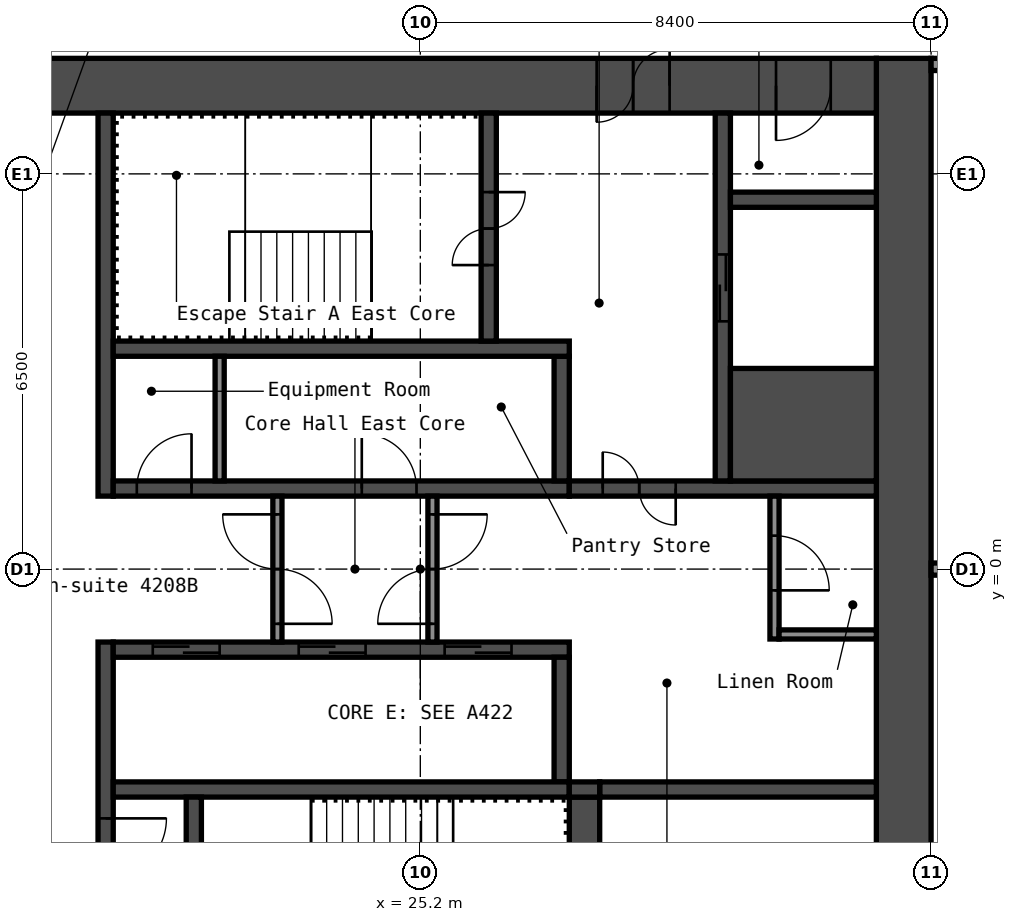
"""IFC4 building model, lengths in metres.
Left out: names, types, materials, properties, quantities, classifications, styles, units other than length and angle.
Written with IfcOpenShell. Run it as: python <this file> out.ifc"""

import sys

from ifc_helpers import new_model, si_unit, direction, frame, frame_2d, origin, place, context, subcontext, project, spatial, rectangle, extrude, element, fill, save


model = new_model("IFC4")
c1 = context("Model", 3, precision=1e-05, world=origin(), true_north=direction((0.0, 1.0)))
c2 = subcontext(c1, "Body", "Model", "MODEL_VIEW")
j1 = project(units=[si_unit("LENGTHUNIT", "METRE"), si_unit("PLANEANGLEUNIT", "RADIAN")], contexts=[c1])
p1 = place(None, origin())
s1 = spatial("IfcSite", under=j1, at=p1, CompositionType="ELEMENT")
p2 = place(p1, origin())
s2 = spatial("IfcBuilding", under=s1, at=p2, CompositionType="ELEMENT")
p3 = place(p2, frame((0.0, 0.0, 150.2)))
s3 = spatial("IfcBuildingStorey", under=s2, at=p3, CompositionType="ELEMENT", Elevation=150.2)
p4 = place(p3, frame((33.15, -8.4, 0.0), z_axis=(0.0, 0.0, 1.0), x_axis=(0.0, 1.0, 0.0)))
e1 = element("IfcWall", 1, at=p4, inside=s3, PredefinedType="SHEAR", context=c2, shape_type="SweptSolid", body=[
    extrude(rectangle(XDim=16.8, YDim=0.9, at=frame_2d((8.4, 0.0))), origin(), (0.0, 0.0, 1.0), 2.75),
])
p5 = place(p3, frame((17.7, 7.95, 0.0), z_axis=(0.0, 0.0, 1.0), x_axis=(1.0, 0.0, 0.0)))
e2 = element("IfcWall", 2, at=p5, inside=s3, PredefinedType="SHEAR", context=c2, shape_type="SweptSolid", body=[
    extrude(rectangle(XDim=15.0, YDim=0.9, at=frame_2d((7.5, 0.0))), origin(), (0.0, 0.0, 1.0), 2.75),
])
p6 = place(p5, frame((10.4, 0.0, 0.0)))
e3 = element("IfcOpeningElement", 3, at=p6, cuts=e2, PredefinedType="OPENING", context=c2, shape_type="SweptSolid", body=[
    extrude(rectangle(XDim=1.2, YDim=2.1, at=frame_2d((0.6, 1.05))), frame((0.0, 0.46, 0.0), z_axis=(0.0, -1.0, 0.0), x_axis=(1.0, 0.0, 0.0)), (0.0, 0.0, 1.0), 0.92),
])
p7 = place(p5, frame((13.35, 0.0, 0.0)))
e4 = element("IfcOpeningElement", 4, at=p7, cuts=e2, PredefinedType="OPENING", context=c2, shape_type="SweptSolid", body=[
    extrude(rectangle(XDim=0.9, YDim=2.1, at=frame_2d((0.45, 1.05))), frame((0.0, 0.46, 0.0), z_axis=(0.0, -1.0, 0.0), x_axis=(1.0, 0.0, 0.0)), (0.0, 0.0, 1.0), 0.92),
])
p8 = place(p3, frame((20.025, 1.2, 0.0), z_axis=(0.0, 0.0, 1.0), x_axis=(0.0, 1.0, 0.0)))
e5 = element("IfcWall", 5, at=p8, inside=s3, PredefinedType="SHEAR", context=c2, shape_type="SweptSolid", body=[
    extrude(rectangle(XDim=6.3, YDim=0.25, at=frame_2d((3.15, 0.0))), origin(), (0.0, 0.0, 1.0), 2.75),
])
p9 = place(p3, frame((20.025, -7.5, 0.0), z_axis=(0.0, 0.0, 1.0), x_axis=(0.0, 1.0, 0.0)))
e6 = element("IfcWall", 6, at=p9, inside=s3, PredefinedType="SHEAR", context=c2, shape_type="SweptSolid", body=[
    extrude(rectangle(XDim=6.3, YDim=0.25, at=frame_2d((3.15, 0.0))), origin(), (0.0, 0.0, 1.0), 2.75),
])
p10 = place(p9, frame((2.4, 0.0, 0.0)))
e7 = element("IfcOpeningElement", 7, at=p10, cuts=e6, PredefinedType="OPENING", context=c2, shape_type="SweptSolid", body=[
    extrude(rectangle(XDim=1.0, YDim=2.1, at=frame_2d((0.5, 1.05))), frame((0.0, 0.135, 0.0), z_axis=(0.0, -1.0, 0.0), x_axis=(1.0, 0.0, 0.0)), (0.0, 0.0, 1.0), 0.27),
])
p11 = place(p3, frame((20.15, 1.325, 0.0), z_axis=(0.0, 0.0, 1.0), x_axis=(1.0, 0.0, 0.0)))
e8 = element("IfcWall", 8, at=p11, inside=s3, PredefinedType="SHEAR", context=c2, shape_type="SweptSolid", body=[
    extrude(rectangle(XDim=7.5, YDim=0.25, at=frame_2d((3.75, 0.0))), origin(), (0.0, 0.0, 1.0), 2.75),
])
p12 = place(p11, frame((0.387, 0.0, 0.0)))
e9 = element("IfcOpeningElement", 9, at=p12, cuts=e8, PredefinedType="OPENING", context=c2, shape_type="SweptSolid", body=[
    extrude(rectangle(XDim=0.9, YDim=2.1, at=frame_2d((0.45, 1.05))), frame((0.0, 0.135, 0.0), z_axis=(0.0, -1.0, 0.0), x_axis=(1.0, 0.0, 0.0)), (0.0, 0.0, 1.0), 0.27),
])
p13 = place(p11, frame((4.087, 0.0, 0.0)))
e10 = element("IfcOpeningElement", 10, at=p13, cuts=e8, PredefinedType="OPENING", context=c2, shape_type="SweptSolid", body=[
    extrude(rectangle(XDim=0.9, YDim=2.1, at=frame_2d((0.45, 1.05))), frame((0.0, 0.135, 0.0), z_axis=(0.0, -1.0, 0.0), x_axis=(1.0, 0.0, 0.0)), (0.0, 0.0, 1.0), 0.27),
])
p14 = place(p3, frame((27.525, 1.45, 0.0), z_axis=(0.0, 0.0, 1.0), x_axis=(0.0, 1.0, 0.0)))
e11 = element("IfcWall", 11, at=p14, inside=s3, PredefinedType="SHEAR", context=c2, shape_type="SweptSolid", body=[
    extrude(rectangle(XDim=2.05, YDim=0.25, at=frame_2d((1.025, 0.0))), origin(), (0.0, 0.0, 1.0), 2.75),
])
p15 = place(p3, frame((20.15, 3.625, 0.0), z_axis=(0.0, 0.0, 1.0), x_axis=(1.0, 0.0, 0.0)))
e12 = element("IfcWall", 12, at=p15, inside=s3, PredefinedType="SHEAR", context=c2, shape_type="SweptSolid", body=[
    extrude(rectangle(XDim=7.5, YDim=0.25, at=frame_2d((3.75, 0.0))), origin(), (0.0, 0.0, 1.0), 2.75),
])
p16 = place(p3, frame((26.325, 3.75, 0.0), z_axis=(0.0, 0.0, 1.0), x_axis=(0.0, 1.0, 0.0)))
e13 = element("IfcWall", 13, at=p16, inside=s3, PredefinedType="SHEAR", context=c2, shape_type="SweptSolid", body=[
    extrude(rectangle(XDim=3.75, YDim=0.25, at=frame_2d((1.875, 0.0))), origin(), (0.0, 0.0, 1.0), 2.75),
])
p17 = place(p16, frame((1.25, 0.0, 0.0)))
e14 = element("IfcOpeningElement", 14, at=p17, cuts=e13, PredefinedType="OPENING", context=c2, shape_type="SweptSolid", body=[
    extrude(rectangle(XDim=1.2, YDim=2.1, at=frame_2d((0.6, 1.05))), frame((0.0, 0.135, 0.0), z_axis=(0.0, -1.0, 0.0), x_axis=(1.0, 0.0, 0.0)), (0.0, 0.0, 1.0), 0.27),
])
p18 = place(p3, frame((27.65, 1.325, 0.0), z_axis=(0.0, 0.0, 1.0), x_axis=(1.0, 0.0, 0.0)))
e15 = element("IfcWall", 15, at=p18, inside=s3, PredefinedType="SHEAR", context=c2, shape_type="SweptSolid", body=[
    extrude(rectangle(XDim=5.05, YDim=0.25, at=frame_2d((2.525, 0.0))), origin(), (0.0, 0.0, 1.0), 2.75),
])
p19 = place(p18, frame((0.55, 0.0, 0.0)))
e16 = element("IfcOpeningElement", 16, at=p19, cuts=e15, PredefinedType="OPENING", context=c2, shape_type="SweptSolid", body=[
    extrude(rectangle(XDim=1.2, YDim=2.1, at=frame_2d((0.6, 1.05))), frame((0.0, 0.135, 0.0), z_axis=(0.0, -1.0, 0.0), x_axis=(1.0, 0.0, 0.0)), (0.0, 0.0, 1.0), 0.27),
])
p20 = place(p3, frame((30.175, 1.45, 0.0), z_axis=(0.0, 0.0, 1.0), x_axis=(0.0, 1.0, 0.0)))
e17 = element("IfcWall", 17, at=p20, inside=s3, PredefinedType="SHEAR", context=c2, shape_type="SweptSolid", body=[
    extrude(rectangle(XDim=6.05, YDim=0.25, at=frame_2d((3.025, 0.0))), origin(), (0.0, 0.0, 1.0), 2.75),
])
p21 = place(p20, frame((2.625, 0.0, 0.0)))
e18 = element("IfcOpeningElement", 18, at=p21, cuts=e17, PredefinedType="OPENING", context=c2, shape_type="SweptSolid", body=[
    extrude(rectangle(XDim=1.1, YDim=2.1, at=frame_2d((0.55, 1.05))), frame((0.0, 0.135, 0.0), z_axis=(0.0, -1.0, 0.0), x_axis=(1.0, 0.0, 0.0)), (0.0, 0.0, 1.0), 0.27),
])
p22 = place(p3, frame((30.3, 2.375, 0.0), z_axis=(0.0, 0.0, 1.0), x_axis=(1.0, 0.0, 0.0)))
e19 = element("IfcWall", 19, at=p22, inside=s3, PredefinedType="SHEAR", context=c2, shape_type="SweptSolid", body=[
    extrude(rectangle(XDim=2.4, YDim=1.85, at=frame_2d((1.2, 0.0))), origin(), (0.0, 0.0, 1.0), 2.75),
])
p23 = place(p3, frame((30.3, 6.075, 0.0), z_axis=(0.0, 0.0, 1.0), x_axis=(1.0, 0.0, 0.0)))
e20 = element("IfcWall", 20, at=p23, inside=s3, PredefinedType="SHEAR", context=c2, shape_type="SweptSolid", body=[
    extrude(rectangle(XDim=2.4, YDim=0.25, at=frame_2d((1.2, 0.0))), origin(), (0.0, 0.0, 1.0), 2.75),
])
p24 = place(p3, frame((20.15, -1.325, 0.0), z_axis=(0.0, 0.0, 1.0), x_axis=(1.0, 0.0, 0.0)))
e21 = element("IfcWall", 21, at=p24, inside=s3, PredefinedType="SHEAR", context=c2, shape_type="SweptSolid", body=[
    extrude(rectangle(XDim=7.5, YDim=0.25, at=frame_2d((3.75, 0.0))), origin(), (0.0, 0.0, 1.0), 2.75),
])
p25 = place(p24, frame((0.65, 0.0, 0.0)))
e22 = element("IfcOpeningElement", 22, at=p25, cuts=e21, PredefinedType="OPENING", context=c2, shape_type="SweptSolid", body=[
    extrude(rectangle(XDim=1.1, YDim=2.1, at=frame_2d((0.55, 1.05))), frame((0.0, 0.135, 0.0), z_axis=(0.0, -1.0, 0.0), x_axis=(1.0, 0.0, 0.0)), (0.0, 0.0, 1.0), 0.27),
])
p26 = place(p24, frame((3.05, 0.0, 0.0)))
e23 = element("IfcOpeningElement", 23, at=p26, cuts=e21, PredefinedType="OPENING", context=c2, shape_type="SweptSolid", body=[
    extrude(rectangle(XDim=1.1, YDim=2.1, at=frame_2d((0.55, 1.05))), frame((0.0, 0.135, 0.0), z_axis=(0.0, -1.0, 0.0), x_axis=(1.0, 0.0, 0.0)), (0.0, 0.0, 1.0), 0.27),
])
p27 = place(p24, frame((5.45, 0.0, 0.0)))
e24 = element("IfcOpeningElement", 24, at=p27, cuts=e21, PredefinedType="OPENING", context=c2, shape_type="SweptSolid", body=[
    extrude(rectangle(XDim=1.1, YDim=2.1, at=frame_2d((0.55, 1.05))), frame((0.0, 0.135, 0.0), z_axis=(0.0, -1.0, 0.0), x_axis=(1.0, 0.0, 0.0)), (0.0, 0.0, 1.0), 0.27),
])
p28 = place(p3, frame((27.525, -3.5, 0.0), z_axis=(0.0, 0.0, 1.0), x_axis=(0.0, 1.0, 0.0)))
e25 = element("IfcWall", 25, at=p28, inside=s3, PredefinedType="SHEAR", context=c2, shape_type="SweptSolid", body=[
    extrude(rectangle(XDim=2.05, YDim=0.25, at=frame_2d((1.025, 0.0))), origin(), (0.0, 0.0, 1.0), 2.75),
])
p29 = place(p3, frame((20.15, -3.625, 0.0), z_axis=(0.0, 0.0, 1.0), x_axis=(1.0, 0.0, 0.0)))
e26 = element("IfcWall", 26, at=p29, inside=s3, PredefinedType="SHEAR", context=c2, shape_type="SweptSolid", body=[
    extrude(rectangle(XDim=7.5, YDim=0.25, at=frame_2d((3.75, 0.0))), origin(), (0.0, 0.0, 1.0), 2.75),
])
p30 = place(p3, frame((21.475, -7.5, 0.0), z_axis=(0.0, 0.0, 1.0), x_axis=(0.0, 1.0, 0.0)))
e27 = element("IfcWall", 27, at=p30, inside=s3, PredefinedType="SHEAR", context=c2, shape_type="SweptSolid", body=[
    extrude(rectangle(XDim=3.75, YDim=0.25, at=frame_2d((1.875, 0.0))), origin(), (0.0, 0.0, 1.0), 2.75),
])
p31 = place(p30, frame((1.3, 0.0, 0.0)))
e28 = element("IfcOpeningElement", 28, at=p31, cuts=e27, PredefinedType="OPENING", context=c2, shape_type="SweptSolid", body=[
    extrude(rectangle(XDim=1.2, YDim=2.1, at=frame_2d((0.6, 1.05))), frame((0.0, 0.135, 0.0), z_axis=(0.0, -1.0, 0.0), x_axis=(1.0, 0.0, 0.0)), (0.0, 0.0, 1.0), 0.27),
])
p32 = place(p3, frame((27.9, -7.5, 0.0), z_axis=(0.0, 0.0, 1.0), x_axis=(0.0, 1.0, 0.0)))
e29 = element("IfcWall", 29, at=p32, inside=s3, PredefinedType="SHEAR", context=c2, shape_type="SweptSolid", body=[
    extrude(rectangle(XDim=3.75, YDim=0.5, at=frame_2d((1.875, 0.0))), origin(), (0.0, 0.0, 1.0), 2.75),
])
p33 = place(p3, frame((28.15, -3.625, 0.0), z_axis=(0.0, 0.0, 1.0), x_axis=(1.0, 0.0, 0.0)))
e30 = element("IfcWall", 30, at=p33, inside=s3, PredefinedType="SHEAR", context=c2, shape_type="SweptSolid", body=[
    extrude(rectangle(XDim=4.55, YDim=0.25, at=frame_2d((2.275, 0.0))), origin(), (0.0, 0.0, 1.0), 2.75),
])
p34 = place(p3, frame((27.65, -3.625, 0.0), z_axis=(0.0, 0.0, 1.0), x_axis=(1.0, 0.0, 0.0)))
e31 = element("IfcWall", 31, at=p34, inside=s3, PredefinedType="SHEAR", context=c2, shape_type="SweptSolid", body=[
    extrude(rectangle(XDim=0.5, YDim=0.25, at=frame_2d((0.25, 0.0))), origin(), (0.0, 0.0, 1.0), 2.75),
])
p35 = place(p3, frame((22.85, -1.2, 0.0), z_axis=(0.0, 0.0, 1.0), x_axis=(0.0, 1.0, 0.0)))
e32 = element("IfcWall", 32, at=p35, inside=s3, PredefinedType="PARTITIONING", context=c2, shape_type="SweptSolid", body=[
    extrude(rectangle(XDim=2.4, YDim=0.15, at=frame_2d((1.2, 0.0))), origin(), (0.0, 0.0, 1.0), 2.75),
])
p36 = place(p35, frame((0.3, 0.0, 0.0)))
e33 = element("IfcOpeningElement", 33, at=p36, cuts=e32, PredefinedType="OPENING", context=c2, shape_type="SweptSolid", body=[
    extrude(rectangle(XDim=1.8, YDim=2.1, at=frame_2d((0.9, 1.05))), frame((0.0, 0.085, 0.0), z_axis=(0.0, -1.0, 0.0), x_axis=(1.0, 0.0, 0.0)), (0.0, 0.0, 1.0), 0.17),
])
p37 = place(p3, frame((25.4, -1.2, 0.0), z_axis=(0.0, 0.0, 1.0), x_axis=(0.0, 1.0, 0.0)))
e34 = element("IfcWall", 34, at=p37, inside=s3, PredefinedType="PARTITIONING", context=c2, shape_type="SweptSolid", body=[
    extrude(rectangle(XDim=2.4, YDim=0.15, at=frame_2d((1.2, 0.0))), origin(), (0.0, 0.0, 1.0), 2.75),
])
p38 = place(p37, frame((0.3, 0.0, 0.0)))
e35 = element("IfcOpeningElement", 35, at=p38, cuts=e34, PredefinedType="OPENING", context=c2, shape_type="SweptSolid", body=[
    extrude(rectangle(XDim=1.8, YDim=2.1, at=frame_2d((0.9, 1.05))), frame((0.0, 0.085, 0.0), z_axis=(0.0, -1.0, 0.0), x_axis=(1.0, 0.0, 0.0)), (0.0, 0.0, 1.0), 0.17),
])
p39 = place(p3, frame((31.025, -1.15, 0.0), z_axis=(0.0, 0.0, 1.0), x_axis=(0.0, 1.0, 0.0)))
e36 = element("IfcWall", 36, at=p39, inside=s3, PredefinedType="PARTITIONING", context=c2, shape_type="SweptSolid", body=[
    extrude(rectangle(XDim=2.35, YDim=0.15, at=frame_2d((1.175, 0.0))), origin(), (0.0, 0.0, 1.0), 2.75),
])
p40 = place(p39, frame((0.8, 0.0, 0.0)))
e37 = element("IfcOpeningElement", 37, at=p40, cuts=e36, PredefinedType="OPENING", context=c2, shape_type="SweptSolid", body=[
    extrude(rectangle(XDim=0.9, YDim=2.1, at=frame_2d((0.45, 1.05))), frame((0.0, 0.085, 0.0), z_axis=(0.0, -1.0, 0.0), x_axis=(1.0, 0.0, 0.0)), (0.0, 0.0, 1.0), 0.17),
])
p41 = place(p3, frame((31.1, -1.075, 0.0), z_axis=(0.0, 0.0, 1.0), x_axis=(1.0, 0.0, 0.0)))
e38 = element("IfcWall", 38, at=p41, inside=s3, PredefinedType="PARTITIONING", context=c2, shape_type="SweptSolid", body=[
    extrude(rectangle(XDim=1.6, YDim=0.15, at=frame_2d((0.8, 0.0))), origin(), (0.0, 0.0, 1.0), 2.75),
])
p42 = place(p3, frame((21.9, 1.45, 0.0), z_axis=(0.0, 0.0, 1.0), x_axis=(0.0, 1.0, 0.0)))
e39 = element("IfcWall", 39, at=p42, inside=s3, PredefinedType="PARTITIONING", context=c2, shape_type="SweptSolid", body=[
    extrude(rectangle(XDim=2.05, YDim=0.15, at=frame_2d((1.025, 0.0))), origin(), (0.0, 0.0, 1.0), 2.75),
])
p43 = place(p3, frame((33.6, 0.0, 0.0), z_axis=(0.0, 0.0, 1.0), x_axis=(1.0, 0.0, 0.0)))
e40 = element("IfcWall", 40, at=p43, inside=s3, PredefinedType="PARTITIONING", context=c2, shape_type="SweptSolid", body=[
    extrude(rectangle(XDim=6.5, YDim=0.2, at=frame_2d((3.25, 0.0))), origin(), (0.0, 0.0, 1.0), 2.75),
])
p44 = place(p3, frame((33.6, 8.3, 0.0), z_axis=(0.0, 0.0, 1.0), x_axis=(1.0, 0.0, 0.0)))
e41 = element("IfcWall", 41, at=p44, inside=s3, PredefinedType="PARTITIONING", context=c2, shape_type="SweptSolid", body=[
    extrude(rectangle(XDim=6.6, YDim=0.2, at=frame_2d((3.3, 0.0))), origin(), (0.0, 0.0, 1.0), 2.75),
])
p45 = place(p44, frame((1.66, 0.0, 0.0)))
e42 = element("IfcOpeningElement", 42, at=p45, cuts=e41, PredefinedType="OPENING", context=c2, shape_type="SweptSolid", body=[
    extrude(rectangle(XDim=0.9, YDim=2.1, at=frame_2d((0.45, 1.05))), frame((0.0, 0.11, 0.0), z_axis=(0.0, -1.0, 0.0), x_axis=(1.0, 0.0, 0.0)), (0.0, 0.0, 1.0), 0.22),
])
p46 = place(p44, frame((4.96, 0.0, 0.0)))
e43 = element("IfcOpeningElement", 43, at=p46, cuts=e41, PredefinedType="OPENING", context=c2, shape_type="SweptSolid", body=[
    extrude(rectangle(XDim=0.9, YDim=2.1, at=frame_2d((0.45, 1.05))), frame((0.0, 0.11, 0.0), z_axis=(0.0, -1.0, 0.0), x_axis=(1.0, 0.0, 0.0)), (0.0, 0.0, 1.0), 0.22),
])
p47 = place(p6, origin())
e44 = element("IfcDoor", 44, at=p47, inside=s3, OperationType="DOUBLE_DOOR_SINGLE_SWING", PredefinedType="DOOR", context=c2, shape_type="SweptSolid", body=[
    extrude(rectangle(XDim=1.2, YDim=2.1, at=frame_2d((0.6, 1.05))), frame((0.0, 0.025, 0.0), z_axis=(0.0, -1.0, 0.0), x_axis=(1.0, 0.0, 0.0)), (0.0, 0.0, 1.0), 0.05),
])
fill(e3, e44)
p48 = place(p7, origin())
e45 = element("IfcDoor", 45, at=p48, inside=s3, OperationType="SINGLE_SWING_LEFT", PredefinedType="DOOR", context=c2, shape_type="SweptSolid", body=[
    extrude(rectangle(XDim=0.9, YDim=2.1, at=frame_2d((0.45, 1.05))), frame((0.0, 0.025, 0.0), z_axis=(0.0, -1.0, 0.0), x_axis=(1.0, 0.0, 0.0)), (0.0, 0.0, 1.0), 0.05),
])
fill(e4, e45)
p49 = place(p17, origin())
e46 = element("IfcDoor", 46, at=p49, inside=s3, OperationType="DOUBLE_DOOR_SINGLE_SWING", PredefinedType="DOOR", context=c2, shape_type="SweptSolid", body=[
    extrude(rectangle(XDim=1.2, YDim=2.1, at=frame_2d((0.6, 1.05))), frame((0.0, 0.025, 0.0), z_axis=(0.0, -1.0, 0.0), x_axis=(1.0, 0.0, 0.0)), (0.0, 0.0, 1.0), 0.05),
])
fill(e14, e46)
p50 = place(p10, origin())
e47 = element("IfcDoor", 47, at=p50, inside=s3, OperationType="SINGLE_SWING_RIGHT", PredefinedType="DOOR", context=c2, shape_type="SweptSolid", body=[
    extrude(rectangle(XDim=1.0, YDim=2.1, at=frame_2d((0.5, 1.05))), frame((0.0, 0.025, 0.0), z_axis=(0.0, -1.0, 0.0), x_axis=(1.0, 0.0, 0.0)), (0.0, 0.0, 1.0), 0.05),
])
fill(e7, e47)
p51 = place(p19, origin())
e48 = element("IfcDoor", 48, at=p51, inside=s3, OperationType="DOUBLE_DOOR_SINGLE_SWING", PredefinedType="DOOR", context=c2, shape_type="SweptSolid", body=[
    extrude(rectangle(XDim=1.2, YDim=2.1, at=frame_2d((0.6, 1.05))), frame((0.0, 0.025, 0.0), z_axis=(0.0, -1.0, 0.0), x_axis=(1.0, 0.0, 0.0)), (0.0, 0.0, 1.0), 0.05),
])
fill(e16, e48)
p52 = place(p36, origin())
e49 = element("IfcDoor", 49, at=p52, inside=s3, OperationType="DOUBLE_DOOR_SINGLE_SWING", PredefinedType="DOOR", context=c2, shape_type="SweptSolid", body=[
    extrude(rectangle(XDim=1.8, YDim=2.1, at=frame_2d((0.9, 1.05))), frame((0.0, 0.025, 0.0), z_axis=(0.0, -1.0, 0.0), x_axis=(1.0, 0.0, 0.0)), (0.0, 0.0, 1.0), 0.05),
])
fill(e33, e49)
p53 = place(p38, origin())
e50 = element("IfcDoor", 50, at=p53, inside=s3, OperationType="DOUBLE_DOOR_SINGLE_SWING", PredefinedType="DOOR", context=c2, shape_type="SweptSolid", body=[
    extrude(rectangle(XDim=1.8, YDim=2.1, at=frame_2d((0.9, 1.05))), frame((0.0, 0.025, 0.0), z_axis=(0.0, -1.0, 0.0), x_axis=(1.0, 0.0, 0.0)), (0.0, 0.0, 1.0), 0.05),
])
fill(e35, e50)
p54 = place(p40, origin())
e51 = element("IfcDoor", 51, at=p54, inside=s3, OperationType="SINGLE_SWING_LEFT", PredefinedType="DOOR", context=c2, shape_type="SweptSolid", body=[
    extrude(rectangle(XDim=0.9, YDim=2.1, at=frame_2d((0.45, 1.05))), frame((0.0, 0.025, 0.0), z_axis=(0.0, -1.0, 0.0), x_axis=(1.0, 0.0, 0.0)), (0.0, 0.0, 1.0), 0.05),
])
fill(e37, e51)
p55 = place(p12, origin())
e52 = element("IfcDoor", 52, at=p55, inside=s3, OperationType="SINGLE_SWING_LEFT", PredefinedType="DOOR", context=c2, shape_type="SweptSolid", body=[
    extrude(rectangle(XDim=0.9, YDim=2.1, at=frame_2d((0.45, 1.05))), frame((0.0, 0.025, 0.0), z_axis=(0.0, -1.0, 0.0), x_axis=(1.0, 0.0, 0.0)), (0.0, 0.0, 1.0), 0.05),
])
fill(e9, e52)
p56 = place(p13, origin())
e53 = element("IfcDoor", 53, at=p56, inside=s3, OperationType="SINGLE_SWING_RIGHT", PredefinedType="DOOR", context=c2, shape_type="SweptSolid", body=[
    extrude(rectangle(XDim=0.9, YDim=2.1, at=frame_2d((0.45, 1.05))), frame((0.0, 0.025, 0.0), z_axis=(0.0, -1.0, 0.0), x_axis=(1.0, 0.0, 0.0)), (0.0, 0.0, 1.0), 0.05),
])
fill(e10, e53)
p57 = place(p25, origin())
e54 = element("IfcDoor", 54, at=p57, inside=s3, OperationType="DOUBLE_DOOR_SLIDING", PredefinedType="DOOR", context=c2, shape_type="SweptSolid", body=[
    extrude(rectangle(XDim=1.1, YDim=2.1, at=frame_2d((0.55, 1.05))), frame((0.0, 0.025, 0.0), z_axis=(0.0, -1.0, 0.0), x_axis=(1.0, 0.0, 0.0)), (0.0, 0.0, 1.0), 0.05),
])
fill(e22, e54)
p58 = place(p26, origin())
e55 = element("IfcDoor", 55, at=p58, inside=s3, OperationType="DOUBLE_DOOR_SLIDING", PredefinedType="DOOR", context=c2, shape_type="SweptSolid", body=[
    extrude(rectangle(XDim=1.1, YDim=2.1, at=frame_2d((0.55, 1.05))), frame((0.0, 0.025, 0.0), z_axis=(0.0, -1.0, 0.0), x_axis=(1.0, 0.0, 0.0)), (0.0, 0.0, 1.0), 0.05),
])
fill(e23, e55)
p59 = place(p27, origin())
e56 = element("IfcDoor", 56, at=p59, inside=s3, OperationType="DOUBLE_DOOR_SLIDING", PredefinedType="DOOR", context=c2, shape_type="SweptSolid", body=[
    extrude(rectangle(XDim=1.1, YDim=2.1, at=frame_2d((0.55, 1.05))), frame((0.0, 0.025, 0.0), z_axis=(0.0, -1.0, 0.0), x_axis=(1.0, 0.0, 0.0)), (0.0, 0.0, 1.0), 0.05),
])
fill(e24, e56)
p60 = place(p21, origin())
e57 = element("IfcDoor", 57, at=p60, inside=s3, OperationType="DOUBLE_DOOR_SLIDING", PredefinedType="DOOR", context=c2, shape_type="SweptSolid", body=[
    extrude(rectangle(XDim=1.1, YDim=2.1, at=frame_2d((0.55, 1.05))), frame((0.0, 0.025, 0.0), z_axis=(0.0, -1.0, 0.0), x_axis=(1.0, 0.0, 0.0)), (0.0, 0.0, 1.0), 0.05),
])
fill(e18, e57)
save(model, sys.argv[1])
